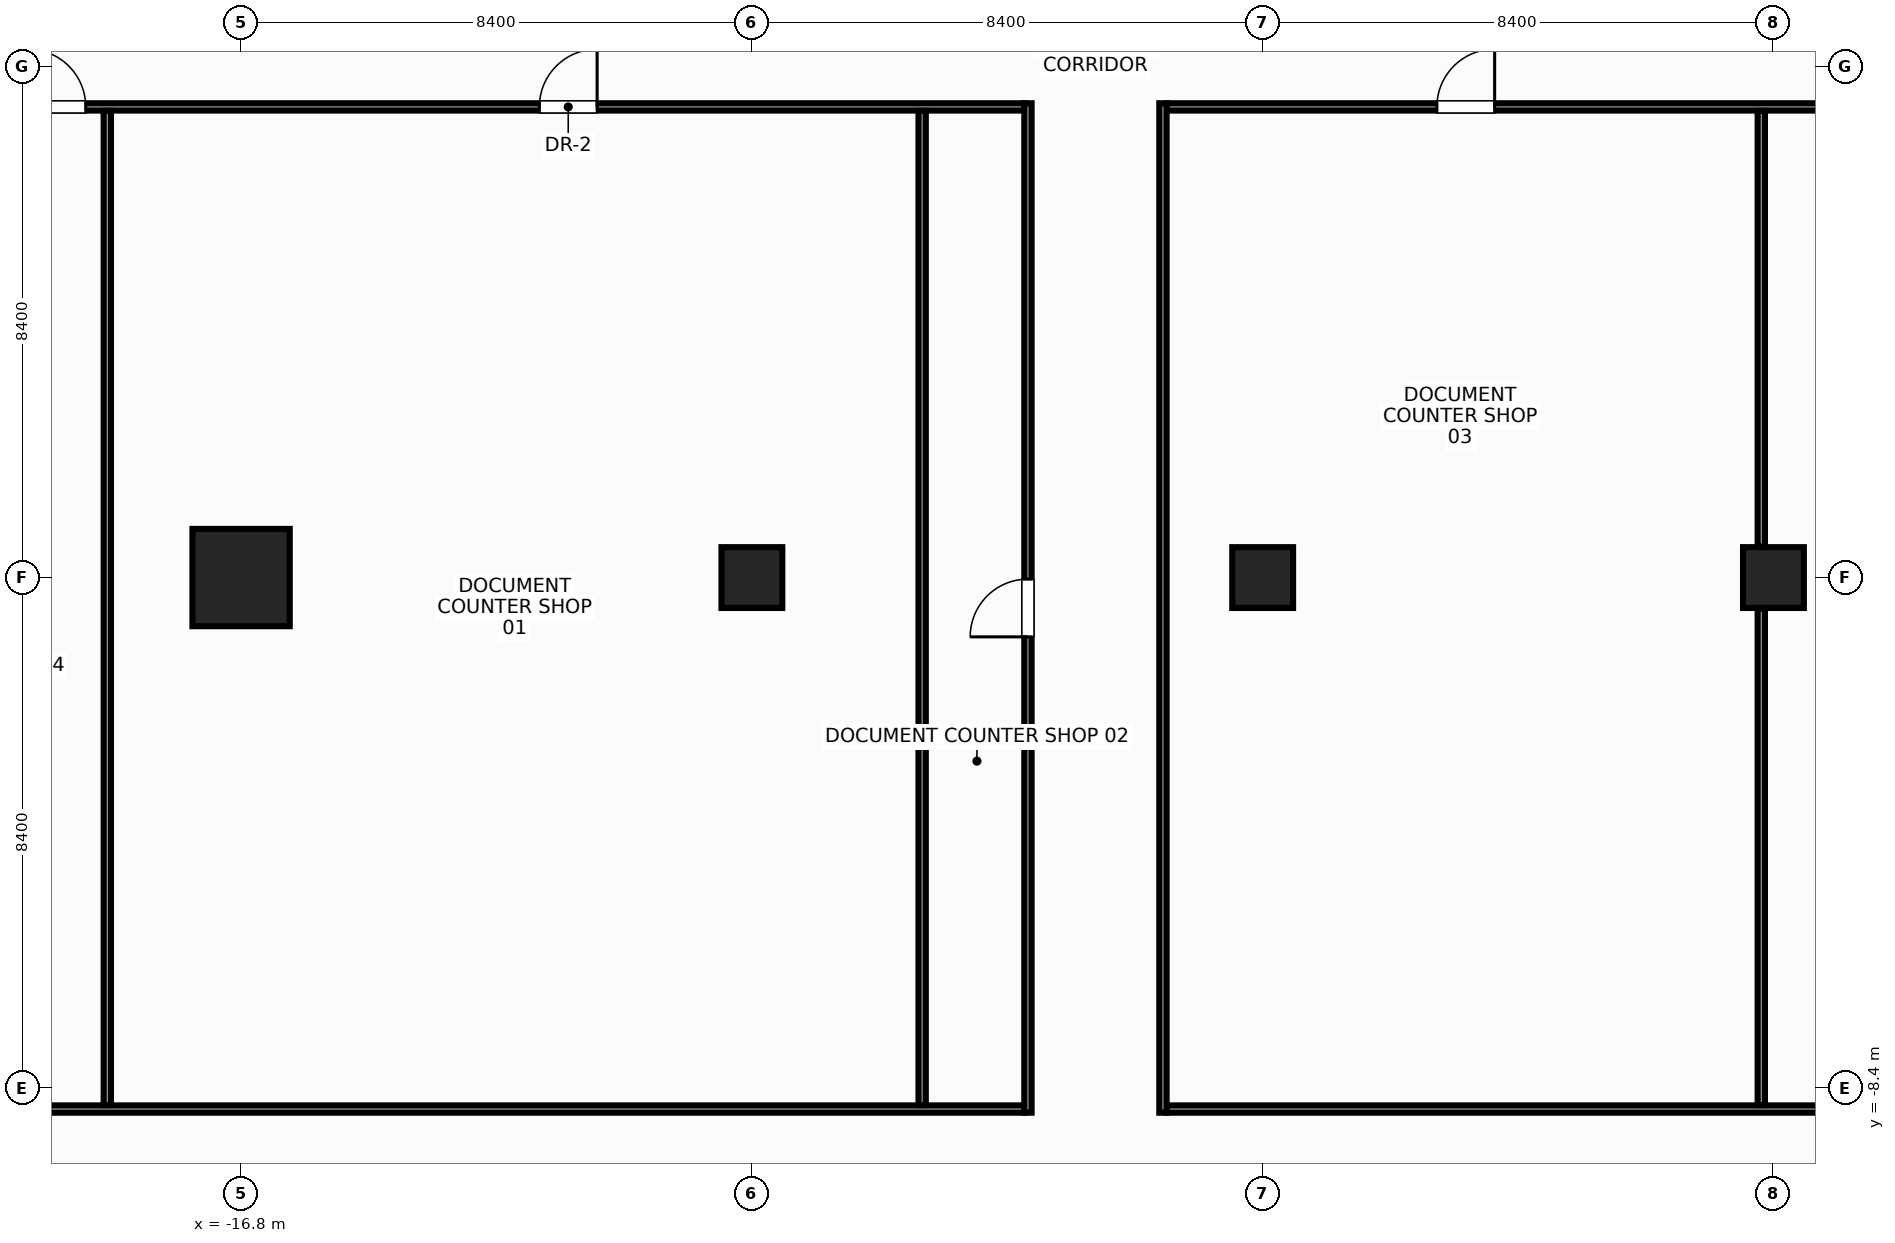
"""IFC4 building model, lengths in metres.
Left out: names, types, materials, properties, quantities, classifications, styles, units other than length and angle.
Written with IfcOpenShell. Run it as: python <this file> out.ifc"""

import sys

from ifc_helpers import new_model, si_unit, direction, frame, frame_2d, origin, origin_with_axes, origin_2d, place, context, subcontext, project, spatial, rectangle, hollow_rectangle, extrude, source, transform, mapped, element, fill, save


model = new_model("IFC4")
c1 = context("Model", 3, precision=1e-05, world=origin(), true_north=direction((0.0, 1.0)))
c2 = subcontext(c1, "Body", "Model", "MODEL_VIEW")
j1 = project(units=[si_unit("LENGTHUNIT", "METRE"), si_unit("PLANEANGLEUNIT", "RADIAN")], contexts=[c1])
p1 = place(None, origin())
s1 = spatial("IfcSite", under=j1, at=p1, CompositionType="ELEMENT")
p2 = place(p1, origin())
s2 = spatial("IfcBuilding", under=s1, at=p2, CompositionType="ELEMENT")
p3 = place(p2, frame((0.0, 0.0, 81.2)))
s3 = spatial("IfcBuildingStorey", under=s2, at=p3, CompositionType="ELEMENT", Elevation=81.2)
m1 = source(origin(), c2, "Body", "SweptSolid", [
    extrude(rectangle(XDim=1.6, YDim=1.6, at=origin_2d()), origin(), (0.0, 0.0, 1.0), 3.6),
])
p4 = place(p3, frame((-16.8, 0.0, 0.0), z_axis=(0.0, 0.0, 1.0), x_axis=(1.0, 0.0, 0.0)))
e1 = element("IfcColumn", 1, at=p4, inside=s3, PredefinedType="COLUMN", context=c2, shape_type="MappedRepresentation", body=[
    mapped(m1, transform((0.0, 0.0, 0.0), x_axis=(1.0, 0.0, 0.0), y_axis=(0.0, 1.0, 0.0), z_axis=(0.0, 0.0, 1.0), scale=1.0)),
])
m2 = source(origin(), c2, "Body", "SweptSolid", [
    extrude(hollow_rectangle(XDim=1.0, YDim=1.0, WallThickness=0.045, at=origin_2d()), origin(), (0.0, 0.0, 1.0), 3.6),
])
for number, where, z_axis, x_axis in (
    (2, (-8.4, 0.0, 0.0), (0.0, 0.0, 1.0), (1.0, 0.0, 0.0)),
    (3, (8.4, 0.0, 0.0), (0.0, 0.0, 1.0), (1.0, 0.0, 0.0)),
):
    element("IfcColumn", number, at=place(p3, frame(where, z_axis=z_axis, x_axis=x_axis)), inside=s3, PredefinedType="COLUMN", context=c2, shape_type="MappedRepresentation", body=[
        mapped(m2, transform((0.0, 0.0, 0.0), x_axis=(1.0, 0.0, 0.0), y_axis=(0.0, 1.0, 0.0), z_axis=(0.0, 0.0, 1.0), scale=1.0)),
    ])
m3 = source(origin(), c2, "Body", "SweptSolid", [
    extrude(rectangle(XDim=1.0, YDim=1.0, at=origin_2d()), origin(), (0.0, 0.0, 1.0), 3.6),
])
p5 = place(p3, origin_with_axes())
e4 = element("IfcColumn", 4, at=p5, inside=s3, PredefinedType="COLUMN", context=c2, shape_type="MappedRepresentation", body=[
    mapped(m3, transform((0.0, 0.0, 0.0), x_axis=(1.0, 0.0, 0.0), y_axis=(0.0, 1.0, 0.0), z_axis=(0.0, 0.0, 1.0), scale=1.0)),
])
m4 = source(origin(), c2, "Body", "SweptSolid", [
    extrude(rectangle(XDim=16.8, YDim=0.12, at=frame_2d((8.4, 0.0))), origin(), (0.0, 0.0, 1.0), 2.745),
])
p6 = place(p3, frame((-20.72, 7.74, 0.0), z_axis=(0.0, 0.0, 1.0), x_axis=(1.0, 0.0, 0.0)))
e5 = element("IfcWall", 5, at=p6, inside=s3, PredefinedType="PARTITIONING", context=c2, shape_type="MappedRepresentation", body=[
    mapped(m4, transform((0.0, 0.0, 0.0), x_axis=(1.0, 0.0, 0.0), y_axis=(0.0, 1.0, 0.0), z_axis=(0.0, 0.0, 1.0), scale=1.0)),
])
p7 = place(p6, frame((8.825, 0.0, 0.0)))
e6 = element("IfcOpeningElement", 6, at=p7, cuts=e5, PredefinedType="OPENING", context=c2, shape_type="SweptSolid", body=[
    extrude(rectangle(XDim=0.95, YDim=2.15, at=frame_2d((0.475, 1.075))), frame((0.0, 0.072, 0.0), z_axis=(0.0, -1.0, 0.0), x_axis=(1.0, 0.0, 0.0)), (0.0, 0.0, 1.0), 0.144),
])
p8 = place(p6, frame((0.415, 0.0, 0.0)))
e7 = element("IfcOpeningElement", 7, at=p8, cuts=e5, PredefinedType="OPENING", context=c2, shape_type="SweptSolid", body=[
    extrude(rectangle(XDim=0.95, YDim=2.15, at=frame_2d((0.475, 1.075))), frame((0.0, 0.072, 0.0), z_axis=(0.0, -1.0, 0.0), x_axis=(1.0, 0.0, 0.0)), (0.0, 0.0, 1.0), 0.144),
])
m5 = source(origin(), c2, "Body", "SweptSolid", [
    extrude(rectangle(XDim=22.3, YDim=0.12, at=frame_2d((11.15, 0.0))), origin(), (0.0, 0.0, 1.0), 2.745),
])
p9 = place(p3, frame((-1.58, 7.74, 0.0), z_axis=(0.0, 0.0, 1.0), x_axis=(1.0, 0.0, 0.0)))
e8 = element("IfcWall", 8, at=p9, inside=s3, PredefinedType="PARTITIONING", context=c2, shape_type="MappedRepresentation", body=[
    mapped(m5, transform((0.0, 0.0, 0.0), x_axis=(1.0, 0.0, 0.0), y_axis=(0.0, 1.0, 0.0), z_axis=(0.0, 0.0, 1.0), scale=1.0)),
])
p10 = place(p9, frame((4.445, 0.0, 0.0)))
e9 = element("IfcOpeningElement", 9, at=p10, cuts=e8, PredefinedType="OPENING", context=c2, shape_type="SweptSolid", body=[
    extrude(rectangle(XDim=0.95, YDim=2.15, at=frame_2d((0.475, 1.075))), frame((0.0, 0.072, 0.0), z_axis=(0.0, -1.0, 0.0), x_axis=(1.0, 0.0, 0.0)), (0.0, 0.0, 1.0), 0.144),
])
p11 = place(p9, frame((15.535, 0.0, 0.0)))
e10 = element("IfcOpeningElement", 10, at=p11, cuts=e8, PredefinedType="OPENING", context=c2, shape_type="SweptSolid", body=[
    extrude(rectangle(XDim=0.95, YDim=2.15, at=frame_2d((0.475, 1.075))), frame((0.0, 0.072, 0.0), z_axis=(0.0, -1.0, 0.0), x_axis=(1.0, 0.0, 0.0)), (0.0, 0.0, 1.0), 0.144),
])
p12 = place(p3, frame((-20.72, -8.74, 0.0), z_axis=(0.0, 0.0, 1.0), x_axis=(1.0, 0.0, 0.0)))
e11 = element("IfcWall", 11, at=p12, inside=s3, PredefinedType="PARTITIONING", context=c2, shape_type="MappedRepresentation", body=[
    mapped(m4, transform((0.0, 0.0, 0.0), x_axis=(1.0, 0.0, 0.0), y_axis=(0.0, 1.0, 0.0), z_axis=(0.0, 0.0, 1.0), scale=1.0)),
])
p13 = place(p3, frame((-1.58, -8.74, 0.0), z_axis=(0.0, 0.0, 1.0), x_axis=(1.0, 0.0, 0.0)))
e12 = element("IfcWall", 12, at=p13, inside=s3, PredefinedType="PARTITIONING", context=c2, shape_type="MappedRepresentation", body=[
    mapped(m5, transform((0.0, 0.0, 0.0), x_axis=(1.0, 0.0, 0.0), y_axis=(0.0, 1.0, 0.0), z_axis=(0.0, 0.0, 1.0), scale=1.0)),
])
m6 = source(origin(), c2, "Body", "SweptSolid", [
    extrude(rectangle(XDim=16.6, YDim=0.12, at=frame_2d((8.3, 0.0))), origin(), (0.0, 0.0, 1.0), 2.645),
])
p14 = place(p3, frame((-3.86, -8.8, 0.0), z_axis=(0.0, 0.0, 1.0), x_axis=(0.0, 1.0, 0.0)))
e13 = element("IfcWall", 13, at=p14, inside=s3, PredefinedType="PARTITIONING", context=c2, shape_type="MappedRepresentation", body=[
    mapped(m6, transform((0.0, 0.0, 0.0), x_axis=(1.0, 0.0, 0.0), y_axis=(0.0, 1.0, 0.0), z_axis=(0.0, 0.0, 1.0), scale=1.0)),
])
p15 = place(p14, frame((7.825, 0.0, 0.0)))
e14 = element("IfcOpeningElement", 14, at=p15, cuts=e13, PredefinedType="OPENING", context=c2, shape_type="SweptSolid", body=[
    extrude(rectangle(XDim=0.95, YDim=2.15, at=frame_2d((0.475, 1.075))), frame((0.0, 0.072, 0.0), z_axis=(0.0, -1.0, 0.0), x_axis=(1.0, 0.0, 0.0)), (0.0, 0.0, 1.0), 0.144),
])
p16 = place(p3, frame((-1.64, -8.8, 0.0), z_axis=(0.0, 0.0, 1.0), x_axis=(0.0, 1.0, 0.0)))
e15 = element("IfcWall", 15, at=p16, inside=s3, PredefinedType="PARTITIONING", context=c2, shape_type="MappedRepresentation", body=[
    mapped(m6, transform((0.0, 0.0, 0.0), x_axis=(1.0, 0.0, 0.0), y_axis=(0.0, 1.0, 0.0), z_axis=(0.0, 0.0, 1.0), scale=1.0)),
])
m7 = source(origin(), c2, "Body", "SweptSolid", [
    extrude(rectangle(XDim=16.35, YDim=0.12, at=frame_2d((8.175, 0.0))), origin(), (0.0, 0.0, 1.0), 2.745),
])
p17 = place(p3, frame((-19.0, -8.675, 0.0), z_axis=(0.0, 0.0, 1.0), x_axis=(0.0, 1.0, 0.0)))
e16 = element("IfcWall", 16, at=p17, inside=s3, PredefinedType="PARTITIONING", context=c2, shape_type="MappedRepresentation", body=[
    mapped(m7, transform((0.0, 0.0, 0.0), x_axis=(1.0, 0.0, 0.0), y_axis=(0.0, 1.0, 0.0), z_axis=(0.0, 0.0, 1.0), scale=1.0)),
])
m8 = source(origin(), c2, "Body", "SweptSolid", [
    extrude(rectangle(XDim=16.35, YDim=0.12, at=frame_2d((8.175, 0.0))), origin(), (0.0, 0.0, 1.0), 2.645),
])
p18 = place(p3, frame((-5.6, -8.675, 0.0), z_axis=(0.0, 0.0, 1.0), x_axis=(0.0, 1.0, 0.0)))
e17 = element("IfcWall", 17, at=p18, inside=s3, PredefinedType="PARTITIONING", context=c2, shape_type="MappedRepresentation", body=[
    mapped(m8, transform((0.0, 0.0, 0.0), x_axis=(1.0, 0.0, 0.0), y_axis=(0.0, 1.0, 0.0), z_axis=(0.0, 0.0, 1.0), scale=1.0)),
])
m9 = source(origin(), c2, "Body", "SweptSolid", [
    extrude(rectangle(XDim=8.165, YDim=0.12, at=frame_2d((4.083, 0.0))), origin(), (0.0, 0.0, 1.0), 2.745),
])
p19 = place(p3, frame((8.2, -8.675, 0.0), z_axis=(0.0, 0.0, 1.0), x_axis=(0.0, 1.0, 0.0)))
e18 = element("IfcWall", 18, at=p19, inside=s3, PredefinedType="PARTITIONING", context=c2, shape_type="MappedRepresentation", body=[
    mapped(m9, transform((0.0, 0.0, 0.0), x_axis=(1.0, 0.0, 0.0), y_axis=(0.0, 1.0, 0.0), z_axis=(0.0, 0.0, 1.0), scale=1.0)),
])
m10 = source(origin(), c2, "Body", "SweptSolid", [
    extrude(rectangle(XDim=7.165, YDim=0.12, at=frame_2d((3.583, 0.0))), origin(), (0.0, 0.0, 1.0), 2.645),
])
p20 = place(p3, frame((8.2, 0.51, 0.0), z_axis=(0.0, 0.0, 1.0), x_axis=(0.0, 1.0, 0.0)))
e19 = element("IfcWall", 19, at=p20, inside=s3, PredefinedType="PARTITIONING", context=c2, shape_type="MappedRepresentation", body=[
    mapped(m10, transform((0.0, 0.0, 0.0), x_axis=(1.0, 0.0, 0.0), y_axis=(0.0, 1.0, 0.0), z_axis=(0.0, 0.0, 1.0), scale=1.0)),
])
m11 = source(origin(), c2, "Body", "SweptSolid", [
    extrude(rectangle(XDim=0.95, YDim=2.15, at=frame_2d((0.475, 1.075))), frame((0.0, 0.025, 0.0), z_axis=(0.0, -1.0, 0.0), x_axis=(1.0, 0.0, 0.0)), (0.0, 0.0, 1.0), 0.05),
])
p21 = place(p7, origin())
e20 = element("IfcDoor", 20, at=p21, inside=s3, OperationType="SINGLE_SWING_RIGHT", PredefinedType="DOOR", context=c2, shape_type="MappedRepresentation", body=[
    mapped(m11, transform((0.0, 0.0, 0.0), x_axis=(1.0, 0.0, 0.0), y_axis=(0.0, 1.0, 0.0), z_axis=(0.0, 0.0, 1.0), scale=1.0)),
])
fill(e6, e20)
p22 = place(p15, origin())
e21 = element("IfcDoor", 21, at=p22, inside=s3, OperationType="SINGLE_SWING_LEFT", PredefinedType="DOOR", context=c2, shape_type="MappedRepresentation", body=[
    mapped(m11, transform((0.0, 0.0, 0.0), x_axis=(1.0, 0.0, 0.0), y_axis=(0.0, 1.0, 0.0), z_axis=(0.0, 0.0, 1.0), scale=1.0)),
])
fill(e14, e21)
p23 = place(p10, origin())
e22 = element("IfcDoor", 22, at=p23, inside=s3, OperationType="SINGLE_SWING_RIGHT", PredefinedType="DOOR", context=c2, shape_type="MappedRepresentation", body=[
    mapped(m11, transform((0.0, 0.0, 0.0), x_axis=(1.0, 0.0, 0.0), y_axis=(0.0, 1.0, 0.0), z_axis=(0.0, 0.0, 1.0), scale=1.0)),
])
fill(e9, e22)
p24 = place(p8, origin())
e23 = element("IfcDoor", 23, at=p24, inside=s3, OperationType="SINGLE_SWING_LEFT", PredefinedType="DOOR", context=c2, shape_type="MappedRepresentation", body=[
    mapped(m11, transform((0.0, 0.0, 0.0), x_axis=(1.0, 0.0, 0.0), y_axis=(0.0, 1.0, 0.0), z_axis=(0.0, 0.0, 1.0), scale=1.0)),
])
fill(e7, e23)
save(model, sys.argv[1])
